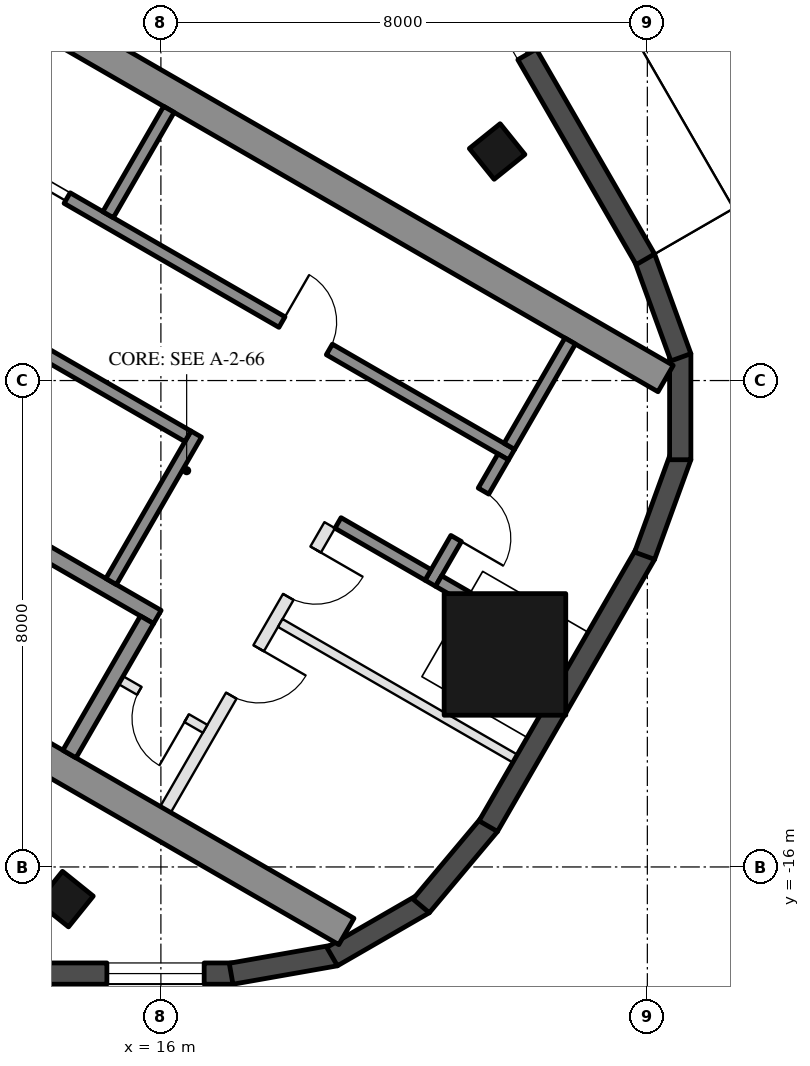
"""IFC4 building model, lengths in metres.
Left out: names, types, materials, properties, quantities, classifications, styles, units other than length and angle.
Written with IfcOpenShell. Run it as: python <this file> out.ifc"""

import sys

from ifc_helpers import new_model, si_unit, direction, frame, frame_2d, origin, origin_2d, place, context, subcontext, project, spatial, rectangle, hollow_rectangle, extrude, boolean, halfspace, element, fill, save


model = new_model("IFC4")
c1 = context("Model", 3, precision=1e-05, world=origin(), true_north=direction((0.0, 1.0)))
c2 = subcontext(c1, "Body", "Model", "MODEL_VIEW")
j1 = project(units=[si_unit("LENGTHUNIT", "METRE"), si_unit("PLANEANGLEUNIT", "RADIAN")], contexts=[c1])
p1 = place(None, origin())
s1 = spatial("IfcSite", under=j1, at=p1, CompositionType="ELEMENT")
p2 = place(p1, origin())
s2 = spatial("IfcBuilding", under=s1, at=p2, CompositionType="ELEMENT")
p3 = place(p2, frame((0.0, 0.0, 287.4)))
s3 = spatial("IfcBuildingStorey", under=s2, at=p3, CompositionType="ELEMENT", Elevation=287.4)
p4 = place(p3, frame((14.431, -16.529, 0.0), z_axis=(-0.121062211455, 0.150389046636, 0.981186565139), x_axis=(0.992602517882, 0.00920416117, 0.121060005413)))
e1 = element("IfcColumn", 1, at=p4, inside=s3, PredefinedType="COLUMN", context=c2, shape_type="SweptSolid", body=[
    boolean("DIFFERENCE", boolean("DIFFERENCE", extrude(hollow_rectangle(XDim=0.65, YDim=0.65, WallThickness=0.03, at=origin_2d()), origin(), (0.0, 0.0, 1.0), 3.771), halfspace(frame((0.0, 0.0, 0.047), z_axis=(0.0, 0.0, 1.0), x_axis=(1.0, 0.0, 0.0)), True)), halfspace(frame((0.0, 0.0, 3.724), z_axis=(0.0, 0.0, 1.0), x_axis=(1.0, 0.0, 0.0)), False)),
])
p5 = place(p3, frame((21.53, -4.233, 0.0), z_axis=(-0.190723355538, 0.02965081359, 0.981195918716), x_axis=(0.48832184533, -0.864229250401, 0.121035441609)))
e2 = element("IfcColumn", 2, at=p5, inside=s3, PredefinedType="COLUMN", context=c2, shape_type="SweptSolid", body=[
    boolean("DIFFERENCE", boolean("DIFFERENCE", extrude(hollow_rectangle(XDim=0.65, YDim=0.65, WallThickness=0.03, at=origin_2d()), origin(), (0.0, 0.0, 1.0), 3.771), halfspace(frame((0.0, 0.0, 0.047), z_axis=(0.0, 0.0, 1.0), x_axis=(1.0, 0.0, 0.0)), True)), halfspace(frame((0.0, 0.0, 3.724), z_axis=(0.0, 0.0, 1.0), x_axis=(1.0, 0.0, 0.0)), False)),
])
p6 = place(p3, frame((21.658, -12.504, 0.0), z_axis=(-0.19033286006, 0.109938628672, 0.975544412268), x_axis=(0.500170259217, 0.865927082262, 0.0)))
e3 = element("IfcColumn", 3, at=p6, inside=s3, PredefinedType="COLUMN", context=c2, shape_type="SweptSolid", body=[
    boolean("DIFFERENCE", boolean("DIFFERENCE", extrude(hollow_rectangle(XDim=2.0, YDim=2.0, WallThickness=0.05, at=origin_2d()), origin(), (0.0, 0.0, 1.0), 3.793), halfspace(frame((0.0, 0.0, 0.113), z_axis=(0.0, 0.0, 1.0), x_axis=(1.0, 0.0, 0.0)), True)), halfspace(frame((0.0, 0.0, 3.68), z_axis=(0.0, 0.0, 1.0), x_axis=(1.0, 0.0, 0.0)), False)),
])
p7 = place(p3, frame((13.531, -17.754, 0.0), z_axis=(0.0, 0.0, 1.0), x_axis=(1.0, 0.0, 0.0)))
e4 = element("IfcWall", 4, at=p7, inside=s3, PredefinedType="SOLIDWALL", context=c2, shape_type="SweptSolid", body=[
    extrude(rectangle(XDim=3.654, YDim=0.35, at=frame_2d((1.827, 0.0))), origin(), (0.0, 0.0, 1.0), 3.55),
])
p8 = place(p7, frame((1.581, 0.0, 0.3)))
e5 = element("IfcOpeningElement", 5, at=p8, cuts=e4, PredefinedType="OPENING", context=c2, shape_type="SweptSolid", body=[
    extrude(rectangle(XDim=1.6, YDim=2.65, at=frame_2d((0.8, 1.325))), frame((0.0, 0.185, 0.0), z_axis=(0.0, -1.0, 0.0), x_axis=(1.0, 0.0, 0.0)), (0.0, 0.0, 1.0), 0.37),
])
for number, where, z_axis, x_axis in (
    (6, (17.155, -17.756, 0.0), (0.0, 0.0, 1.0), (0.985, 0.174, 0.0)),
    (7, (18.816, -17.474, 0.0), (0.0, 0.0, 1.0), (0.866, 0.5, 0.0)),
    (8, (20.28, -16.641, 0.0), (0.0, 0.0, 1.0), (0.643, 0.766, 0.0)),
):
    element("IfcWall", number, at=place(p3, frame(where, z_axis=z_axis, x_axis=x_axis)), inside=s3, PredefinedType="SOLIDWALL", context=c2, shape_type="SweptSolid", body=[
        extrude(rectangle(XDim=1.745, YDim=0.35, at=frame_2d((0.872, 0.0))), origin(), (0.0, 0.0, 1.0), 3.55),
    ])
p9 = place(p3, frame((21.384, -15.33, 0.0), z_axis=(0.0, 0.0, 1.0), x_axis=(0.500020983425, 0.866013288659, 0.0)))
e9 = element("IfcWall", 9, at=p9, inside=s3, PredefinedType="SOLIDWALL", context=c2, shape_type="SweptSolid", body=[
    extrude(rectangle(XDim=5.168, YDim=0.35, at=frame_2d((2.584, 0.0))), origin(), (0.0, 0.0, 1.0), 3.55),
])
for number, where, z_axis, x_axis in (
    (10, (23.955, -10.882, 0.0), (0.0, 0.0, 1.0), (0.342, 0.94, 0.0)),
    (11, (24.541, -9.302, 0.0), (0.0, 0.0, 1.0), (0.0, 1.0, 0.0)),
    (12, (24.552, -7.618, 0.0), (0.0, 0.0, 1.0), (-0.342, 0.94, 0.0)),
):
    element("IfcWall", number, at=place(p3, frame(where, z_axis=z_axis, x_axis=x_axis)), inside=s3, PredefinedType="SOLIDWALL", context=c2, shape_type="SweptSolid", body=[
        extrude(rectangle(XDim=1.745, YDim=0.35, at=frame_2d((0.872, 0.0))), origin(), (0.0, 0.0, 1.0), 3.55),
    ])
p10 = place(p3, frame((23.968, -6.006, 0.0), z_axis=(0.0, 0.0, 1.0), x_axis=(-0.500008899612, 0.86602026553, 0.0)))
e13 = element("IfcWall", 13, at=p10, inside=s3, PredefinedType="SOLIDWALL", context=c2, shape_type="SweptSolid", body=[
    extrude(rectangle(XDim=10.87, YDim=0.35, at=frame_2d((5.435, 0.0))), origin(), (0.0, 0.0, 1.0), 3.55),
])
p11 = place(p10, frame((6.891, 0.0, 0.0)))
e14 = element("IfcOpeningElement", 14, at=p11, cuts=e13, PredefinedType="OPENING", context=c2, shape_type="SweptSolid", body=[
    extrude(rectangle(XDim=2.4, YDim=2.4, at=frame_2d((1.2, 1.2))), frame((0.0, 0.185, 0.0), z_axis=(0.0, -1.0, 0.0), x_axis=(1.0, 0.0, 0.0)), (0.0, 0.0, 1.0), 0.37),
])
p12 = place(p10, frame((3.892, 0.0, 0.3)))
e15 = element("IfcOpeningElement", 15, at=p12, cuts=e13, PredefinedType="OPENING", context=c2, shape_type="SweptSolid", body=[
    extrude(rectangle(XDim=2.6, YDim=2.65, at=frame_2d((1.3, 1.325))), frame((0.0, 0.185, 0.0), z_axis=(0.0, -1.0, 0.0), x_axis=(1.0, 0.0, 0.0)), (0.0, 0.0, 1.0), 0.37),
])
for number, where, z_axis, x_axis in (
    (16, (8.547, -10.997, 0.0), (0.0, 0.0, 1.0), (0.866, -0.5, 0.0)),
    (17, (13.797, -1.903, 0.0), (0.0, 0.0, 1.0), (0.866, -0.5, 0.0)),
):
    element("IfcWall", number, at=place(p3, frame(where, z_axis=z_axis, x_axis=x_axis)), inside=s3, PredefinedType="SHEAR", context=c2, shape_type="SweptSolid", body=[
        extrude(rectangle(XDim=12.129, YDim=0.5, at=frame_2d((6.064, 0.0))), origin(), (0.0, 0.0, 1.0), 3.5),
    ])
p13 = place(p3, frame((10.356, -8.664, 0.0), z_axis=(0.0, 0.0, 1.0), x_axis=(0.866028629588, -0.499994412703, 0.0)))
e18 = element("IfcWall", 18, at=p13, inside=s3, PredefinedType="SHEAR", context=c2, shape_type="SweptSolid", body=[
    extrude(rectangle(XDim=6.45, YDim=0.25, at=frame_2d((3.225, 0.0))), origin(), (0.0, 0.0, 1.0), 3.5),
])
p14 = place(p13, frame((0.3, 0.0, 0.0)))
e19 = element("IfcOpeningElement", 19, at=p14, cuts=e18, PredefinedType="OPENING", context=c2, shape_type="SweptSolid", body=[
    extrude(rectangle(XDim=1.0, YDim=2.1, at=frame_2d((0.5, 1.05))), frame((0.0, 0.135, 0.0), z_axis=(0.0, -1.0, 0.0), x_axis=(1.0, 0.0, 0.0)), (0.0, 0.0, 1.0), 0.27),
])
p15 = place(p3, frame((14.496, -14.143, 0.0), z_axis=(0.0, 0.0, 1.0), x_axis=(0.500062241894, 0.865989465428, 0.0)))
e20 = element("IfcWall", 20, at=p15, inside=s3, PredefinedType="SHEAR", context=c2, shape_type="SweptSolid", body=[
    extrude(rectangle(XDim=2.55, YDim=0.25, at=frame_2d((1.275, 0.0))), origin(), (0.0, 0.0, 1.0), 3.5),
])
p16 = place(p3, frame((15.181, -11.305, 0.0), z_axis=(0.0, 0.0, 1.0), x_axis=(0.49994636267, 0.866056369097, 0.0)))
e21 = element("IfcWall", 21, at=p16, inside=s3, PredefinedType="SHEAR", context=c2, shape_type="SweptSolid", body=[
    extrude(rectangle(XDim=2.8, YDim=0.2, at=frame_2d((1.4, 0.0))), origin(), (0.0, 0.0, 1.0), 3.5),
])
p17 = place(p3, frame((14.02, -7.517, 0.0), z_axis=(0.0, 0.0, 1.0), x_axis=(0.866034573852, -0.49998411664, 0.0)))
e22 = element("IfcWall", 22, at=p17, inside=s3, PredefinedType="SHEAR", context=c2, shape_type="SweptSolid", body=[
    extrude(rectangle(XDim=2.8, YDim=0.2, at=frame_2d((1.4, 0.0))), origin(), (0.0, 0.0, 1.0), 3.5),
])
p18 = place(p3, frame((12.968, -4.138, 0.0), z_axis=(0.0, 0.0, 1.0), x_axis=(0.866028328073, -0.49999493495, 0.0)))
e23 = element("IfcWall", 23, at=p18, inside=s3, PredefinedType="SHEAR", context=c2, shape_type="SweptSolid", body=[
    extrude(rectangle(XDim=10.16, YDim=0.2, at=frame_2d((5.08, 0.0))), origin(), (0.0, 0.0, 1.0), 3.5),
])
p19 = place(p18, frame((0.62, 0.0, 0.0)))
e24 = element("IfcOpeningElement", 24, at=p19, cuts=e23, PredefinedType="OPENING", context=c2, shape_type="SweptSolid", body=[
    extrude(rectangle(XDim=1.1, YDim=2.1, at=frame_2d((0.55, 1.05))), frame((0.0, 0.11, 0.0), z_axis=(0.0, -1.0, 0.0), x_axis=(1.0, 0.0, 0.0)), (0.0, 0.0, 1.0), 0.22),
])
p20 = place(p18, frame((5.8, 0.0, 0.0)))
e25 = element("IfcOpeningElement", 25, at=p20, cuts=e23, PredefinedType="OPENING", context=c2, shape_type="SweptSolid", body=[
    extrude(rectangle(XDim=0.9, YDim=2.1, at=frame_2d((0.45, 1.05))), frame((0.0, 0.11, 0.0), z_axis=(0.0, -1.0, 0.0), x_axis=(1.0, 0.0, 0.0)), (0.0, 0.0, 1.0), 0.22),
])
p21 = place(p3, frame((20.43, -11.333, 0.0), z_axis=(0.0, 0.0, 1.0), x_axis=(0.500001309137, 0.866024647952, 0.0)))
e26 = element("IfcWall", 26, at=p21, inside=s3, PredefinedType="SHEAR", context=c2, shape_type="SweptSolid", body=[
    extrude(rectangle(XDim=2.4, YDim=0.2, at=frame_2d((1.2, 0.0))), origin(), (0.0, 0.0, 1.0), 3.5),
])
p22 = place(p21, frame((0.85, 0.0, 0.0)))
e27 = element("IfcOpeningElement", 27, at=p22, cuts=e26, PredefinedType="OPENING", context=c2, shape_type="SweptSolid", body=[
    extrude(rectangle(XDim=0.9, YDim=2.1, at=frame_2d((0.45, 1.05))), frame((0.0, 0.11, 0.0), z_axis=(0.0, -1.0, 0.0), x_axis=(1.0, 0.0, 0.0)), (0.0, 0.0, 1.0), 0.22),
])
p23 = place(p3, frame((18.913, -10.342, 0.0), z_axis=(0.0, 0.0, 1.0), x_axis=(0.866038183914, -0.499977863513, 0.0)))
e28 = element("IfcWall", 28, at=p23, inside=s3, PredefinedType="SHEAR", context=c2, shape_type="SweptSolid", body=[
    extrude(rectangle(XDim=1.71, YDim=0.2, at=frame_2d((0.855, 0.0))), origin(), (0.0, 0.0, 1.0), 3.5),
])
for number, where, z_axis, x_axis in (
    (29, (15.131, -5.272, 0.0), (0.0, 0.0, 1.0), (0.5, 0.866, 0.0)),
    (30, (21.73, -9.082, 0.0), (0.0, 0.0, 1.0), (0.5, 0.866, 0.0)),
):
    element("IfcWall", number, at=place(p3, frame(where, z_axis=z_axis, x_axis=x_axis)), inside=s3, PredefinedType="SHEAR", context=c2, shape_type="SweptSolid", body=[
        extrude(rectangle(XDim=2.0, YDim=0.2, at=frame_2d((1.0, 0.0))), origin(), (0.0, 0.0, 1.0), 3.5),
    ])
p24 = place(p3, frame((20.567, -11.297, 0.0), z_axis=(0.0, 0.0, 1.0), x_axis=(0.866237429803, -0.49963258021, 0.0)))
e31 = element("IfcWall", 31, at=p24, inside=s3, PredefinedType="SHEAR", context=c2, shape_type="SweptSolid", body=[
    extrude(rectangle(XDim=0.549, YDim=0.2, at=frame_2d((0.274, 0.0))), origin(), (0.0, 0.0, 1.0), 3.5),
])
p25 = place(p3, frame((16.076, -15.055, 0.0), z_axis=(0.0, 0.0, 1.0), x_axis=(0.499995103361, 0.866028230842, 0.0)))
e32 = element("IfcWall", 32, at=p25, inside=s3, PredefinedType="PARTITIONING", context=c2, shape_type="SweptSolid", body=[
    extrude(rectangle(XDim=5.4, YDim=0.2, at=frame_2d((2.7, 0.0))), origin(), (0.0, 0.0, 1.0), 3.5),
])
p26 = place(p25, frame((2.163, 0.0, 0.0)))
e33 = element("IfcOpeningElement", 33, at=p26, cuts=e32, PredefinedType="OPENING", context=c2, shape_type="SweptSolid", body=[
    extrude(rectangle(XDim=0.9, YDim=2.1, at=frame_2d((0.45, 1.05))), frame((0.0, 0.11, 0.0), z_axis=(0.0, -1.0, 0.0), x_axis=(1.0, 0.0, 0.0)), (0.0, 0.0, 1.0), 0.22),
])
p27 = place(p25, frame((4.038, 0.0, 0.0)))
e34 = element("IfcOpeningElement", 34, at=p27, cuts=e32, PredefinedType="OPENING", context=c2, shape_type="SweptSolid", body=[
    extrude(rectangle(XDim=0.9, YDim=2.1, at=frame_2d((0.45, 1.05))), frame((0.0, 0.11, 0.0), z_axis=(0.0, -1.0, 0.0), x_axis=(1.0, 0.0, 0.0)), (0.0, 0.0, 1.0), 0.22),
])
p28 = place(p3, frame((15.342, -12.928, 0.0), z_axis=(0.0, 0.0, 1.0), x_axis=(0.865989903783, -0.500061482766, 0.0)))
e35 = element("IfcWall", 35, at=p28, inside=s3, PredefinedType="PARTITIONING", context=c2, shape_type="SweptSolid", body=[
    extrude(rectangle(XDim=1.6, YDim=0.15, at=frame_2d((0.8, 0.0))), origin(), (0.0, 0.0, 1.0), 3.5),
])
p29 = place(p28, frame((0.35, 0.0, 0.0)))
e36 = element("IfcOpeningElement", 36, at=p29, cuts=e35, PredefinedType="OPENING", context=c2, shape_type="SweptSolid", body=[
    extrude(rectangle(XDim=0.9, YDim=2.1, at=frame_2d((0.45, 1.05))), frame((0.0, 0.085, 0.0), z_axis=(0.0, -1.0, 0.0), x_axis=(1.0, 0.0, 0.0)), (0.0, 0.0, 1.0), 0.17),
])
p30 = place(p3, frame((17.963, -11.987, 0.0), z_axis=(0.0, 0.0, 1.0), x_axis=(0.866010510293, -0.500025795397, 0.0)))
e37 = element("IfcWall", 37, at=p30, inside=s3, PredefinedType="PARTITIONING", context=c2, shape_type="SweptSolid", body=[
    extrude(rectangle(XDim=4.459, YDim=0.15, at=frame_2d((2.229, 0.0))), origin(), (0.0, 0.0, 1.0), 3.5),
])
p31 = place(p8, origin())
e38 = element("IfcWindow", 38, at=p31, inside=s3, PartitioningType="SINGLE_PANEL", PredefinedType="WINDOW", context=c2, shape_type="SweptSolid", body=[
    extrude(rectangle(XDim=1.6, YDim=2.65, at=frame_2d((0.8, 1.325))), frame((0.0, 0.03, 0.0), z_axis=(0.0, -1.0, 0.0), x_axis=(1.0, 0.0, 0.0)), (0.0, 0.0, 1.0), 0.06),
])
fill(e5, e38)
p32 = place(p12, origin())
e39 = element("IfcWindow", 39, at=p32, inside=s3, PartitioningType="SINGLE_PANEL", PredefinedType="WINDOW", context=c2, shape_type="SweptSolid", body=[
    extrude(rectangle(XDim=2.6, YDim=2.65, at=frame_2d((1.3, 1.325))), frame((0.0, 0.03, 0.0), z_axis=(0.0, -1.0, 0.0), x_axis=(1.0, 0.0, 0.0)), (0.0, 0.0, 1.0), 0.06),
])
fill(e15, e39)
p33 = place(p29, frame((0.9, 0.0, 0.0), z_axis=(0.0, 0.0, 1.0), x_axis=(-1.0, 0.0, 0.0)))
e40 = element("IfcDoor", 40, at=p33, inside=s3, OperationType="SINGLE_SWING_LEFT", PredefinedType="DOOR", context=c2, shape_type="SweptSolid", body=[
    extrude(rectangle(XDim=0.9, YDim=2.1, at=frame_2d((0.45, 1.05))), frame((0.0, 0.025, 0.0), z_axis=(0.0, -1.0, 0.0), x_axis=(1.0, 0.0, 0.0)), (0.0, 0.0, 1.0), 0.05),
])
fill(e36, e40)
p34 = place(p19, origin())
e41 = element("IfcDoor", 41, at=p34, inside=s3, OperationType="DOUBLE_DOOR_SLIDING", PredefinedType="DOOR", context=c2, shape_type="SweptSolid", body=[
    extrude(rectangle(XDim=1.1, YDim=2.1, at=frame_2d((0.55, 1.05))), frame((0.0, 0.025, 0.0), z_axis=(0.0, -1.0, 0.0), x_axis=(1.0, 0.0, 0.0)), (0.0, 0.0, 1.0), 0.05),
])
fill(e24, e41)
p35 = place(p20, origin())
e42 = element("IfcDoor", 42, at=p35, inside=s3, OperationType="SINGLE_SWING_LEFT", PredefinedType="DOOR", context=c2, shape_type="SweptSolid", body=[
    extrude(rectangle(XDim=0.9, YDim=2.1, at=frame_2d((0.45, 1.05))), frame((0.0, 0.025, 0.0), z_axis=(0.0, -1.0, 0.0), x_axis=(1.0, 0.0, 0.0)), (0.0, 0.0, 1.0), 0.05),
])
fill(e25, e42)
p36 = place(p22, frame((0.9, 0.0, 0.0), z_axis=(0.0, 0.0, 1.0), x_axis=(-1.0, 0.0, 0.0)))
e43 = element("IfcDoor", 43, at=p36, inside=s3, OperationType="SINGLE_SWING_RIGHT", PredefinedType="DOOR", context=c2, shape_type="SweptSolid", body=[
    extrude(rectangle(XDim=0.9, YDim=2.1, at=frame_2d((0.45, 1.05))), frame((0.0, 0.025, 0.0), z_axis=(0.0, -1.0, 0.0), x_axis=(1.0, 0.0, 0.0)), (0.0, 0.0, 1.0), 0.05),
])
fill(e27, e43)
p37 = place(p26, frame((0.9, 0.0, 0.0), z_axis=(0.0, 0.0, 1.0), x_axis=(-1.0, 0.0, 0.0)))
e44 = element("IfcDoor", 44, at=p37, inside=s3, OperationType="SINGLE_SWING_LEFT", PredefinedType="DOOR", context=c2, shape_type="SweptSolid", body=[
    extrude(rectangle(XDim=0.9, YDim=2.1, at=frame_2d((0.45, 1.05))), frame((0.0, 0.025, 0.0), z_axis=(0.0, -1.0, 0.0), x_axis=(1.0, 0.0, 0.0)), (0.0, 0.0, 1.0), 0.05),
])
fill(e33, e44)
p38 = place(p27, frame((0.9, 0.0, 0.0), z_axis=(0.0, 0.0, 1.0), x_axis=(-1.0, 0.0, 0.0)))
e45 = element("IfcDoor", 45, at=p38, inside=s3, OperationType="SINGLE_SWING_LEFT", PredefinedType="DOOR", context=c2, shape_type="SweptSolid", body=[
    extrude(rectangle(XDim=0.9, YDim=2.1, at=frame_2d((0.45, 1.05))), frame((0.0, 0.025, 0.0), z_axis=(0.0, -1.0, 0.0), x_axis=(1.0, 0.0, 0.0)), (0.0, 0.0, 1.0), 0.05),
])
fill(e34, e45)
save(model, sys.argv[1])
